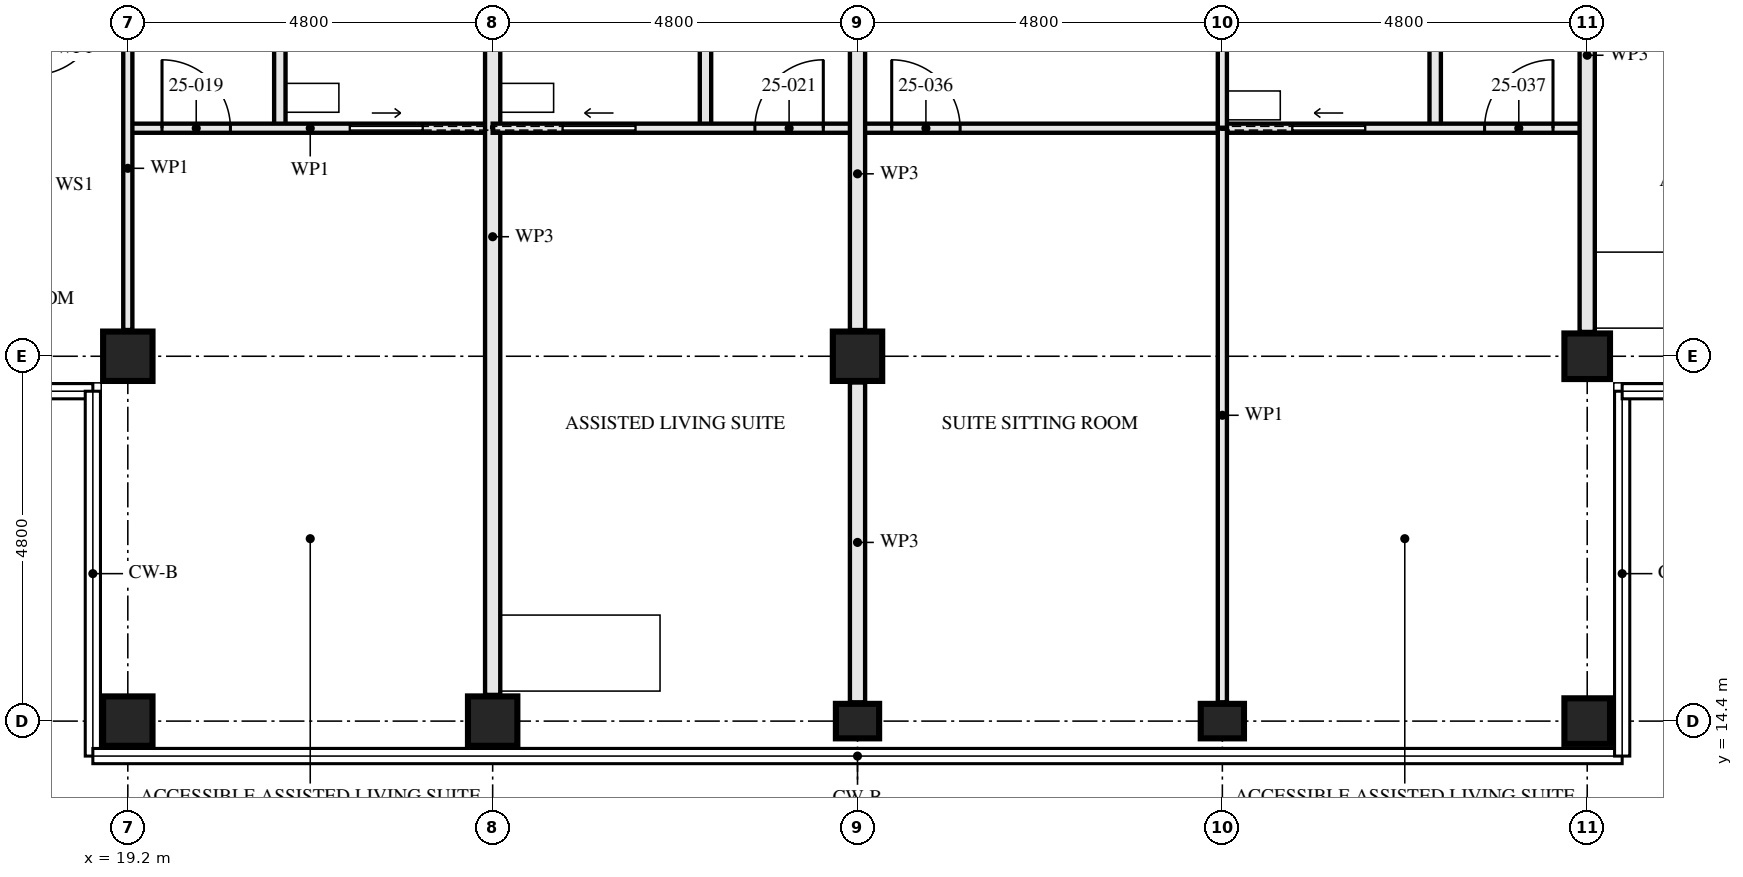
"""IFC4 building model, lengths in metres.
Left out: names, types, materials, properties, quantities, classifications, styles, units other than length and angle.
Written with IfcOpenShell. Run it as: python <this file> out.ifc"""

import sys

from ifc_helpers import new_model, si_unit, direction, frame, frame_2d, origin, origin_2d, place, context, subcontext, project, spatial, rectangle, hollow_rectangle, i_section, extrude, element, fill, save


model = new_model("IFC4")
c1 = context("Model", 3, precision=1e-05, world=origin(), true_north=direction((0.0, 1.0)))
c2 = subcontext(c1, "Body", "Model", "MODEL_VIEW")
j1 = project(units=[si_unit("LENGTHUNIT", "METRE"), si_unit("PLANEANGLEUNIT", "RADIAN")], contexts=[c1])
p1 = place(None, origin())
s1 = spatial("IfcSite", under=j1, at=p1, CompositionType="ELEMENT")
p2 = place(p1, origin())
s2 = spatial("IfcBuilding", under=s1, at=p2, CompositionType="ELEMENT")
p3 = place(p2, frame((0.0, 0.0, 94.5)))
s3 = spatial("IfcBuildingStorey", under=s2, at=p3, CompositionType="ELEMENT", Elevation=94.5)
for number, where, z_axis, x_axis in (
    (1, (19.2, 14.4, 0.0), (0.0, 0.0, 1.0), (0.0, 1.0, 0.0)),
    (2, (19.2, 19.2, 0.0), (0.0, 0.0, 1.0), (0.0, 1.0, 0.0)),
    (3, (24.0, 14.4, 0.0), (0.0, 0.0, 1.0), (0.0, 1.0, 0.0)),
):
    element("IfcColumn", number, at=place(p3, frame(where, z_axis=z_axis, x_axis=x_axis)), inside=s3, PredefinedType="COLUMN", context=c2, shape_type="SweptSolid", body=[
        extrude(hollow_rectangle(XDim=0.65, YDim=0.65, WallThickness=0.08, at=origin_2d()), origin(), (0.0, 0.0, 1.0), 3.5),
    ])
p4 = place(p3, frame((28.8, 14.4, 0.0), z_axis=(0.0, 0.0, 1.0), x_axis=(0.0, 1.0, 0.0)))
e4 = element("IfcColumn", 4, at=p4, inside=s3, PredefinedType="COLUMN", context=c2, shape_type="SweptSolid", body=[
    extrude(i_section(OverallWidth=0.454, OverallDepth=0.569, WebThickness=0.078, FlangeThickness=0.125, FilletRadius=0.015, at=origin_2d()), origin(), (0.0, 0.0, 1.0), 3.5),
])
p5 = place(p3, frame((28.8, 19.2, 0.0), z_axis=(0.0, 0.0, 1.0), x_axis=(1.0, 0.0, 0.0)))
e5 = element("IfcColumn", 5, at=p5, inside=s3, PredefinedType="COLUMN", context=c2, shape_type="SweptSolid", body=[
    extrude(hollow_rectangle(XDim=0.65, YDim=0.65, WallThickness=0.05, at=origin_2d()), origin(), (0.0, 0.0, 1.0), 3.5),
])
p6 = place(p3, frame((33.6, 14.4, 0.0), z_axis=(0.0, 0.0, 1.0), x_axis=(0.0, 1.0, 0.0)))
e6 = element("IfcColumn", 6, at=p6, inside=s3, PredefinedType="COLUMN", context=c2, shape_type="SweptSolid", body=[
    extrude(i_section(OverallWidth=0.454, OverallDepth=0.569, WebThickness=0.078, FlangeThickness=0.125, FilletRadius=0.015, at=origin_2d()), origin(), (0.0, 0.0, 1.0), 3.5),
])
for number, where, z_axis, x_axis in (
    (7, (38.4, 14.4, 0.0), (0.0, 0.0, 1.0), (0.0, 1.0, 0.0)),
    (8, (38.4, 19.2, 0.0), (0.0, 0.0, 1.0), (0.0, 1.0, 0.0)),
):
    element("IfcColumn", number, at=place(p3, frame(where, z_axis=z_axis, x_axis=x_axis)), inside=s3, PredefinedType="COLUMN", context=c2, shape_type="SweptSolid", body=[
        extrude(hollow_rectangle(XDim=0.6, YDim=0.6, WallThickness=0.05, at=origin_2d()), origin(), (0.0, 0.0, 1.0), 3.5),
    ])
p7 = place(p3, frame((21.2, 22.2, 0.0), z_axis=(0.0, 0.0, 1.0), x_axis=(0.0, 1.0, 0.0)))
e9 = element("IfcWall", 9, at=p7, inside=s3, PredefinedType="PARTITIONING", context=c2, shape_type="SweptSolid", body=[
    extrude(rectangle(XDim=3.0, YDim=0.15, at=frame_2d((1.5, 0.0))), origin(), (0.0, 0.0, 1.0), 2.55),
])
p8 = place(p3, frame((19.2, 22.2, 0.0), z_axis=(0.0, 0.0, 1.0), x_axis=(1.0, 0.0, 0.0)))
e10 = element("IfcWall", 10, at=p8, inside=s3, PredefinedType="PARTITIONING", context=c2, shape_type="SweptSolid", body=[
    extrude(rectangle(XDim=4.8, YDim=0.12, at=frame_2d((2.4, 0.0))), origin(), (0.0, 0.0, 1.0), 3.33),
])
p9 = place(p8, frame((0.45, 0.0, 0.0)))
e11 = element("IfcOpeningElement", 11, at=p9, cuts=e10, PredefinedType="OPENING", context=c2, shape_type="SweptSolid", body=[
    extrude(rectangle(XDim=0.9, YDim=2.1, at=frame_2d((0.45, 1.05))), frame((0.0, 0.071, 0.0), z_axis=(0.0, -1.0, 0.0), x_axis=(1.0, 0.0, 0.0)), (0.0, 0.0, 1.0), 0.141),
])
p10 = place(p8, frame((2.925, 0.0, 0.0)))
e12 = element("IfcOpeningElement", 12, at=p10, cuts=e10, PredefinedType="OPENING", context=c2, shape_type="SweptSolid", body=[
    extrude(rectangle(XDim=0.95, YDim=2.1, at=frame_2d((0.475, 1.05))), frame((0.0, 0.071, 0.0), z_axis=(0.0, -1.0, 0.0), x_axis=(1.0, 0.0, 0.0)), (0.0, 0.0, 1.0), 0.141),
])
p11 = place(p3, frame((19.2, 19.545, 0.0), z_axis=(0.0, 0.0, 1.0), x_axis=(0.0, 1.0, 0.0)))
e13 = element("IfcWall", 13, at=p11, inside=s3, PredefinedType="PARTITIONING", context=c2, shape_type="SweptSolid", body=[
    extrude(rectangle(XDim=4.255, YDim=0.12, at=frame_2d((2.127, 0.0))), origin(), (0.0, 0.0, 1.0), 2.55),
])
p12 = place(p3, frame((24.0, 14.745, 0.0), z_axis=(0.0, 0.0, 1.0), x_axis=(0.0, 1.0, 0.0)))
e14 = element("IfcWall", 14, at=p12, inside=s3, PredefinedType="PARTITIONING", context=c2, shape_type="SweptSolid", body=[
    extrude(rectangle(XDim=12.055, YDim=0.2, at=frame_2d((6.027, 0.0))), origin(), (0.0, 0.0, 1.0), 2.55),
])
p13 = place(p3, frame((26.8, 22.2, 0.0), z_axis=(0.0, 0.0, 1.0), x_axis=(0.0, 1.0, 0.0)))
e15 = element("IfcWall", 15, at=p13, inside=s3, PredefinedType="PARTITIONING", context=c2, shape_type="SweptSolid", body=[
    extrude(rectangle(XDim=3.0, YDim=0.15, at=frame_2d((1.5, 0.0))), origin(), (0.0, 0.0, 1.0), 2.55),
])
p14 = place(p3, frame((24.0, 22.2, 0.0), z_axis=(0.0, 0.0, 1.0), x_axis=(1.0, 0.0, 0.0)))
e16 = element("IfcWall", 16, at=p14, inside=s3, PredefinedType="PARTITIONING", context=c2, shape_type="SweptSolid", body=[
    extrude(rectangle(XDim=4.8, YDim=0.12, at=frame_2d((2.4, 0.0))), origin(), (0.0, 0.0, 1.0), 3.33),
])
p15 = place(p14, frame((3.45, 0.0, 0.0)))
e17 = element("IfcOpeningElement", 17, at=p15, cuts=e16, PredefinedType="OPENING", context=c2, shape_type="SweptSolid", body=[
    extrude(rectangle(XDim=0.9, YDim=2.1, at=frame_2d((0.45, 1.05))), frame((0.0, 0.071, 0.0), z_axis=(0.0, -1.0, 0.0), x_axis=(1.0, 0.0, 0.0)), (0.0, 0.0, 1.0), 0.141),
])
p16 = place(p14, frame((0.925, 0.0, 0.0)))
e18 = element("IfcOpeningElement", 18, at=p16, cuts=e16, PredefinedType="OPENING", context=c2, shape_type="SweptSolid", body=[
    extrude(rectangle(XDim=0.95, YDim=2.1, at=frame_2d((0.475, 1.05))), frame((0.0, 0.071, 0.0), z_axis=(0.0, -1.0, 0.0), x_axis=(1.0, 0.0, 0.0)), (0.0, 0.0, 1.0), 0.141),
])
p17 = place(p3, frame((36.4, 22.2, 0.0), z_axis=(0.0, 0.0, 1.0), x_axis=(0.0, 1.0, 0.0)))
e19 = element("IfcWall", 19, at=p17, inside=s3, PredefinedType="PARTITIONING", context=c2, shape_type="SweptSolid", body=[
    extrude(rectangle(XDim=3.0, YDim=0.15, at=frame_2d((1.5, 0.0))), origin(), (0.0, 0.0, 1.0), 2.55),
])
p18 = place(p3, frame((33.6, 22.2, 0.0), z_axis=(0.0, 0.0, 1.0), x_axis=(0.0, 1.0, 0.0)))
e20 = element("IfcWall", 20, at=p18, inside=s3, PredefinedType="PARTITIONING", context=c2, shape_type="SweptSolid", body=[
    extrude(rectangle(XDim=4.65, YDim=0.12, at=frame_2d((2.325, 0.0))), origin(), (0.0, 0.0, 1.0), 2.55),
])
p19 = place(p18, frame((3.35, 0.0, 0.0)))
e21 = element("IfcOpeningElement", 21, at=p19, cuts=e20, PredefinedType="OPENING", context=c2, shape_type="SweptSolid", body=[
    extrude(rectangle(XDim=0.9, YDim=2.1, at=frame_2d((0.45, 1.05))), frame((0.0, 0.071, 0.0), z_axis=(0.0, -1.0, 0.0), x_axis=(1.0, 0.0, 0.0)), (0.0, 0.0, 1.0), 0.141),
])
p20 = place(p3, frame((28.8, 22.2, 0.0), z_axis=(0.0, 0.0, 1.0), x_axis=(1.0, 0.0, 0.0)))
e22 = element("IfcWall", 22, at=p20, inside=s3, PredefinedType="PARTITIONING", context=c2, shape_type="SweptSolid", body=[
    extrude(rectangle(XDim=4.8, YDim=0.12, at=frame_2d((2.4, 0.0))), origin(), (0.0, 0.0, 1.0), 3.33),
])
p21 = place(p20, frame((0.45, 0.0, 0.0)))
e23 = element("IfcOpeningElement", 23, at=p21, cuts=e22, PredefinedType="OPENING", context=c2, shape_type="SweptSolid", body=[
    extrude(rectangle(XDim=0.9, YDim=2.1, at=frame_2d((0.45, 1.05))), frame((0.0, 0.071, 0.0), z_axis=(0.0, -1.0, 0.0), x_axis=(1.0, 0.0, 0.0)), (0.0, 0.0, 1.0), 0.141),
])
p22 = place(p3, frame((33.6, 22.2, 0.0), z_axis=(0.0, 0.0, 1.0), x_axis=(1.0, 0.0, 0.0)))
e24 = element("IfcWall", 24, at=p22, inside=s3, PredefinedType="PARTITIONING", context=c2, shape_type="SweptSolid", body=[
    extrude(rectangle(XDim=4.8, YDim=0.12, at=frame_2d((2.4, 0.0))), origin(), (0.0, 0.0, 1.0), 3.33),
])
p23 = place(p22, frame((3.45, 0.0, 0.0)))
e25 = element("IfcOpeningElement", 25, at=p23, cuts=e24, PredefinedType="OPENING", context=c2, shape_type="SweptSolid", body=[
    extrude(rectangle(XDim=0.9, YDim=2.1, at=frame_2d((0.45, 1.05))), frame((0.0, 0.071, 0.0), z_axis=(0.0, -1.0, 0.0), x_axis=(1.0, 0.0, 0.0)), (0.0, 0.0, 1.0), 0.141),
])
p24 = place(p22, frame((0.925, 0.0, 0.0)))
e26 = element("IfcOpeningElement", 26, at=p24, cuts=e24, PredefinedType="OPENING", context=c2, shape_type="SweptSolid", body=[
    extrude(rectangle(XDim=0.95, YDim=2.1, at=frame_2d((0.475, 1.05))), frame((0.0, 0.071, 0.0), z_axis=(0.0, -1.0, 0.0), x_axis=(1.0, 0.0, 0.0)), (0.0, 0.0, 1.0), 0.141),
])
p25 = place(p3, frame((33.6, 14.647, 0.0), z_axis=(0.0, 0.0, 1.0), x_axis=(0.0, 1.0, 0.0)))
e27 = element("IfcWall", 27, at=p25, inside=s3, PredefinedType="PARTITIONING", context=c2, shape_type="SweptSolid", body=[
    extrude(rectangle(XDim=7.553, YDim=0.12, at=frame_2d((3.776, 0.0))), origin(), (0.0, 0.0, 1.0), 2.55),
])
p26 = place(p3, frame((38.4, 19.52, 0.0), z_axis=(0.0, 0.0, 1.0), x_axis=(0.0, 1.0, 0.0)))
e28 = element("IfcWall", 28, at=p26, inside=s3, PredefinedType="PARTITIONING", context=c2, shape_type="SweptSolid", body=[
    extrude(rectangle(XDim=7.28, YDim=0.2, at=frame_2d((3.64, 0.0))), origin(), (0.0, 0.0, 1.0), 2.55),
])
p27 = place(p3, frame((28.8, 14.647, 0.0), z_axis=(0.0, 0.0, 1.0), x_axis=(0.0, 1.0, 0.0)))
e29 = element("IfcWall", 29, at=p27, inside=s3, PredefinedType="PARTITIONING", context=c2, shape_type="SweptSolid", body=[
    extrude(rectangle(XDim=4.208, YDim=0.2, at=frame_2d((2.104, 0.0))), origin(), (0.0, 0.0, 1.0), 2.32),
])
p28 = place(p3, frame((28.8, 19.545, 0.0), z_axis=(0.0, 0.0, 1.0), x_axis=(0.0, 1.0, 0.0)))
e30 = element("IfcWall", 30, at=p28, inside=s3, PredefinedType="PARTITIONING", context=c2, shape_type="SweptSolid", body=[
    extrude(rectangle(XDim=4.11, YDim=0.2, at=frame_2d((2.055, 0.0))), origin(), (0.0, 0.0, 1.0), 2.32),
])
p29 = place(p9, origin())
e31 = element("IfcDoor", 31, at=p29, inside=s3, OperationType="SINGLE_SWING_RIGHT", PredefinedType="DOOR", context=c2, shape_type="SweptSolid", body=[
    extrude(rectangle(XDim=0.9, YDim=2.1, at=frame_2d((0.45, 1.05))), frame((0.0, 0.022, 0.0), z_axis=(0.0, -1.0, 0.0), x_axis=(1.0, 0.0, 0.0)), (0.0, 0.0, 1.0), 0.044),
])
fill(e11, e31)
p30 = place(p10, origin())
e32 = element("IfcDoor", 32, at=p30, inside=s3, OperationType="SLIDING_TO_LEFT", PredefinedType="DOOR", context=c2, shape_type="SweptSolid", body=[
    extrude(rectangle(XDim=0.95, YDim=2.1, at=frame_2d((0.475, 1.05))), frame((0.0, 0.022, 0.0), z_axis=(0.0, -1.0, 0.0), x_axis=(1.0, 0.0, 0.0)), (0.0, 0.0, 1.0), 0.044),
])
fill(e12, e32)
p31 = place(p15, origin())
e33 = element("IfcDoor", 33, at=p31, inside=s3, OperationType="SINGLE_SWING_LEFT", PredefinedType="DOOR", context=c2, shape_type="SweptSolid", body=[
    extrude(rectangle(XDim=0.9, YDim=2.1, at=frame_2d((0.45, 1.05))), frame((0.0, 0.022, 0.0), z_axis=(0.0, -1.0, 0.0), x_axis=(1.0, 0.0, 0.0)), (0.0, 0.0, 1.0), 0.044),
])
fill(e17, e33)
p32 = place(p16, origin())
e34 = element("IfcDoor", 34, at=p32, inside=s3, OperationType="SLIDING_TO_RIGHT", PredefinedType="DOOR", context=c2, shape_type="SweptSolid", body=[
    extrude(rectangle(XDim=0.95, YDim=2.1, at=frame_2d((0.475, 1.05))), frame((0.0, 0.022, 0.0), z_axis=(0.0, -1.0, 0.0), x_axis=(1.0, 0.0, 0.0)), (0.0, 0.0, 1.0), 0.044),
])
fill(e18, e34)
p33 = place(p21, origin())
e35 = element("IfcDoor", 35, at=p33, inside=s3, OperationType="SINGLE_SWING_RIGHT", PredefinedType="DOOR", context=c2, shape_type="SweptSolid", body=[
    extrude(rectangle(XDim=0.9, YDim=2.1, at=frame_2d((0.45, 1.05))), frame((0.0, 0.022, 0.0), z_axis=(0.0, -1.0, 0.0), x_axis=(1.0, 0.0, 0.0)), (0.0, 0.0, 1.0), 0.044),
])
fill(e23, e35)
p34 = place(p23, origin())
e36 = element("IfcDoor", 36, at=p34, inside=s3, OperationType="SINGLE_SWING_LEFT", PredefinedType="DOOR", context=c2, shape_type="SweptSolid", body=[
    extrude(rectangle(XDim=0.9, YDim=2.1, at=frame_2d((0.45, 1.05))), frame((0.0, 0.022, 0.0), z_axis=(0.0, -1.0, 0.0), x_axis=(1.0, 0.0, 0.0)), (0.0, 0.0, 1.0), 0.044),
])
fill(e25, e36)
p35 = place(p24, origin())
e37 = element("IfcDoor", 37, at=p35, inside=s3, OperationType="SLIDING_TO_RIGHT", PredefinedType="DOOR", context=c2, shape_type="SweptSolid", body=[
    extrude(rectangle(XDim=0.95, YDim=2.1, at=frame_2d((0.475, 1.05))), frame((0.0, 0.022, 0.0), z_axis=(0.0, -1.0, 0.0), x_axis=(1.0, 0.0, 0.0)), (0.0, 0.0, 1.0), 0.044),
])
fill(e26, e37)
save(model, sys.argv[1])
